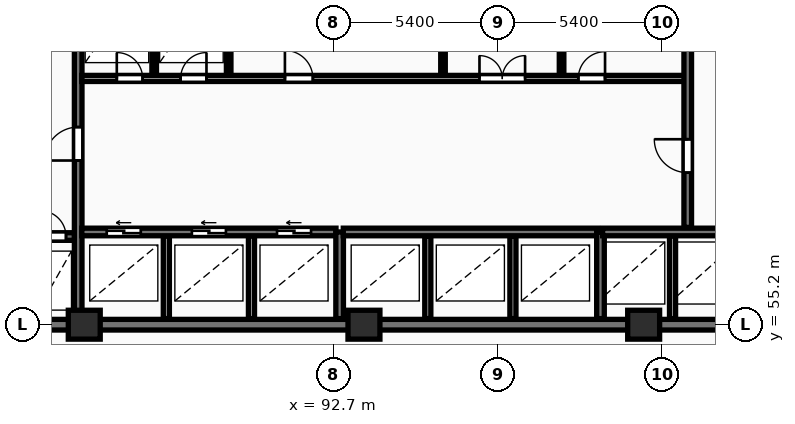
"""IFC4 building model, lengths in metres.
Left out: names, types, materials, properties, quantities, classifications, styles, units other than length and angle.
Written with IfcOpenShell. Run it as: python <this file> out.ifc"""

import sys

from ifc_helpers import new_model, si_unit, direction, frame, frame_2d, origin, origin_2d, place, context, subcontext, project, spatial, rectangle, extrude, element, fill, save


model = new_model("IFC4")
c1 = context("Model", 3, precision=1e-05, world=origin(), true_north=direction((0.0, 1.0)))
c2 = subcontext(c1, "Body", "Model", "MODEL_VIEW")
j1 = project(units=[si_unit("LENGTHUNIT", "METRE"), si_unit("PLANEANGLEUNIT", "RADIAN")], contexts=[c1])
p1 = place(None, origin())
s1 = spatial("IfcSite", under=j1, at=p1, CompositionType="ELEMENT")
p2 = place(p1, origin())
s2 = spatial("IfcBuilding", under=s1, at=p2, CompositionType="ELEMENT")
p3 = place(p2, frame((0.0, 0.0, 24.0)))
s3 = spatial("IfcBuildingStorey", under=s2, at=p3, CompositionType="ELEMENT", Elevation=24.0)
for number, where, z_axis, x_axis in (
    (1, (84.5, 55.2, 0.0), (0.0, 0.0, 1.0), (1.0, 0.0, 0.0)),
    (2, (93.7, 55.2, 0.0), (0.0, 0.0, 1.0), (1.0, 0.0, 0.0)),
    (3, (102.9, 55.2, 0.0), (0.0, 0.0, 1.0), (1.0, 0.0, 0.0)),
):
    element("IfcColumn", number, at=place(p3, frame(where, z_axis=z_axis, x_axis=x_axis)), inside=s3, PredefinedType="COLUMN", context=c2, shape_type="SweptSolid", body=[
        extrude(rectangle(XDim=1.05, YDim=0.95, at=origin_2d()), origin(), (0.0, 0.0, 1.0), 3.25),
    ])
p4 = place(p3, frame((75.95, 55.2, 0.0), z_axis=(0.0, 0.0, 1.0), x_axis=(1.0, 0.0, 0.0)))
e4 = element("IfcWall", 4, at=p4, inside=s3, PredefinedType="SHEAR", context=c2, shape_type="SweptSolid", body=[
    extrude(rectangle(XDim=36.3, YDim=0.35, at=frame_2d((18.15, 0.0))), origin(), (0.0, 0.0, 1.0), 3.25),
])
p5 = place(p3, frame((79.79, 58.1, 0.0), z_axis=(0.0, 0.0, 1.0), x_axis=(1.0, 0.0, 0.0)))
e5 = element("IfcWall", 5, at=p5, inside=s3, PredefinedType="SHEAR", context=c2, shape_type="SweptSolid", body=[
    extrude(rectangle(XDim=4.39, YDim=0.25, at=frame_2d((2.195, 0.0))), origin(), (0.0, 0.0, 1.0), 3.25),
])
p6 = place(p5, frame((1.05, 0.0, 0.0)))
e6 = element("IfcOpeningElement", 6, at=p6, cuts=e5, PredefinedType="OPENING", context=c2, shape_type="SweptSolid", body=[
    extrude(rectangle(XDim=1.12, YDim=2.12, at=frame_2d((0.56, 1.06))), frame((0.0, 0.135, 0.0), z_axis=(0.0, -1.0, 0.0), x_axis=(1.0, 0.0, 0.0)), (0.0, 0.0, 1.0), 0.27),
])
p7 = place(p5, frame((3.26, 0.0, 0.0)))
e7 = element("IfcOpeningElement", 7, at=p7, cuts=e5, PredefinedType="OPENING", context=c2, shape_type="SweptSolid", body=[
    extrude(rectangle(XDim=0.85, YDim=2.05, at=frame_2d((0.425, 1.025))), frame((0.0, 0.135, 0.0), z_axis=(0.0, -1.0, 0.0), x_axis=(1.0, 0.0, 0.0)), (0.0, 0.0, 1.0), 0.27),
])
p8 = place(p3, frame((84.3, 55.4, 0.0), z_axis=(0.0, 0.0, 1.0), x_axis=(0.0, 1.0, 0.0)))
e8 = element("IfcWall", 8, at=p8, inside=s3, PredefinedType="SHEAR", context=c2, shape_type="SweptSolid", body=[
    extrude(rectangle(XDim=11.6, YDim=0.25, at=frame_2d((5.8, 0.0))), origin(), (0.0, 0.0, 1.0), 3.25),
])
p9 = place(p8, frame((5.2, 0.0, 0.0)))
e9 = element("IfcOpeningElement", 9, at=p9, cuts=e8, PredefinedType="OPENING", context=c2, shape_type="SweptSolid", body=[
    extrude(rectangle(XDim=1.1, YDim=2.1, at=frame_2d((0.55, 1.05))), frame((0.0, 0.135, 0.0), z_axis=(0.0, -1.0, 0.0), x_axis=(1.0, 0.0, 0.0)), (0.0, 0.0, 1.0), 0.27),
])
for number, where, z_axis, x_axis in (
    (10, (87.2, 55.4, 0.0), (0.0, 0.0, 1.0), (0.0, 1.0, 0.0)),
    (11, (90.0, 55.4, 0.0), (0.0, 0.0, 1.0), (0.0, 1.0, 0.0)),
):
    element("IfcWall", number, at=place(p3, frame(where, z_axis=z_axis, x_axis=x_axis)), inside=s3, PredefinedType="PARTITIONING", context=c2, shape_type="SweptSolid", body=[
        extrude(rectangle(XDim=2.72, YDim=0.2, at=frame_2d((1.36, 0.0))), origin(), (0.0, 0.0, 1.0), 2.97),
    ])
p10 = place(p3, frame((84.42, 58.25, 0.0), z_axis=(0.0, 0.0, 1.0), x_axis=(1.0, 0.0, 0.0)))
e12 = element("IfcWall", 12, at=p10, inside=s3, PredefinedType="SHEAR", context=c2, shape_type="SweptSolid", body=[
    extrude(rectangle(XDim=8.36, YDim=0.25, at=frame_2d((4.18, 0.0))), origin(), (0.0, 0.0, 1.0), 3.25),
])
p11 = place(p10, frame((0.82, 0.0, 0.0)))
e13 = element("IfcOpeningElement", 13, at=p11, cuts=e12, PredefinedType="OPENING", context=c2, shape_type="SweptSolid", body=[
    extrude(rectangle(XDim=1.12, YDim=2.12, at=frame_2d((0.56, 1.06))), frame((0.0, 0.135, 0.0), z_axis=(0.0, -1.0, 0.0), x_axis=(1.0, 0.0, 0.0)), (0.0, 0.0, 1.0), 0.27),
])
p12 = place(p10, frame((3.62, 0.0, 0.0)))
e14 = element("IfcOpeningElement", 14, at=p12, cuts=e12, PredefinedType="OPENING", context=c2, shape_type="SweptSolid", body=[
    extrude(rectangle(XDim=1.12, YDim=2.12, at=frame_2d((0.56, 1.06))), frame((0.0, 0.135, 0.0), z_axis=(0.0, -1.0, 0.0), x_axis=(1.0, 0.0, 0.0)), (0.0, 0.0, 1.0), 0.27),
])
p13 = place(p10, frame((6.42, 0.0, 0.0)))
e15 = element("IfcOpeningElement", 15, at=p13, cuts=e12, PredefinedType="OPENING", context=c2, shape_type="SweptSolid", body=[
    extrude(rectangle(XDim=1.12, YDim=2.12, at=frame_2d((0.56, 1.06))), frame((0.0, 0.135, 0.0), z_axis=(0.0, -1.0, 0.0), x_axis=(1.0, 0.0, 0.0)), (0.0, 0.0, 1.0), 0.27),
])
p14 = place(p3, frame((92.9, 55.4, 0.0), z_axis=(0.0, 0.0, 1.0), x_axis=(0.0, 1.0, 0.0)))
e16 = element("IfcWall", 16, at=p14, inside=s3, PredefinedType="SHEAR", context=c2, shape_type="SweptSolid", body=[
    extrude(rectangle(XDim=2.85, YDim=0.25, at=frame_2d((1.425, 0.0))), origin(), (0.0, 0.0, 1.0), 3.25),
])
for number, where, z_axis, x_axis in (
    (17, (95.8, 55.4, 0.0), (0.0, 0.0, 1.0), (0.0, 1.0, 0.0)),
    (18, (98.6, 55.4, 0.0), (0.0, 0.0, 1.0), (0.0, 1.0, 0.0)),
):
    element("IfcWall", number, at=place(p3, frame(where, z_axis=z_axis, x_axis=x_axis)), inside=s3, PredefinedType="PARTITIONING", context=c2, shape_type="SweptSolid", body=[
        extrude(rectangle(XDim=2.72, YDim=0.2, at=frame_2d((1.36, 0.0))), origin(), (0.0, 0.0, 1.0), 2.97),
    ])
p15 = place(p3, frame((93.02, 58.25, 0.0), z_axis=(0.0, 0.0, 1.0), x_axis=(1.0, 0.0, 0.0)))
e19 = element("IfcWall", 19, at=p15, inside=s3, PredefinedType="SHEAR", context=c2, shape_type="SweptSolid", body=[
    extrude(rectangle(XDim=8.36, YDim=0.25, at=frame_2d((4.18, 0.0))), origin(), (0.0, 0.0, 1.0), 3.25),
])
p16 = place(p3, frame((101.48, 55.4, 0.0), z_axis=(0.0, 0.0, 1.0), x_axis=(0.0, 1.0, 0.0)))
e20 = element("IfcWall", 20, at=p16, inside=s3, PredefinedType="SHEAR", context=c2, shape_type="SweptSolid", body=[
    extrude(rectangle(XDim=2.85, YDim=0.25, at=frame_2d((1.425, 0.0))), origin(), (0.0, 0.0, 1.0), 3.25),
])
p17 = place(p3, frame((103.85, 55.4, 0.0), z_axis=(0.0, 0.0, 1.0), x_axis=(0.0, 1.0, 0.0)))
e21 = element("IfcWall", 21, at=p17, inside=s3, PredefinedType="PARTITIONING", context=c2, shape_type="SweptSolid", body=[
    extrude(rectangle(XDim=2.72, YDim=0.2, at=frame_2d((1.36, 0.0))), origin(), (0.0, 0.0, 1.0), 2.97),
])
p18 = place(p3, frame((101.55, 58.25, 0.0), z_axis=(0.0, 0.0, 1.0), x_axis=(1.0, 0.0, 0.0)))
e22 = element("IfcWall", 22, at=p18, inside=s3, PredefinedType="SHEAR", context=c2, shape_type="SweptSolid", body=[
    extrude(rectangle(XDim=4.6, YDim=0.25, at=frame_2d((2.3, 0.0))), origin(), (0.0, 0.0, 1.0), 3.25),
])
for number, where, z_axis, x_axis in (
    (23, (86.8, 63.4, 0.0), (0.0, 0.0, 1.0), (0.0, 1.0, 0.0)),
    (24, (89.25, 63.4, 0.0), (0.0, 0.0, 1.0), (0.0, 1.0, 0.0)),
    (25, (96.3, 63.4, 0.0), (0.0, 0.0, 1.0), (0.0, 1.0, 0.0)),
    (26, (100.2, 63.4, 0.0), (0.0, 0.0, 1.0), (0.0, 1.0, 0.0)),
):
    element("IfcWall", number, at=place(p3, frame(where, z_axis=z_axis, x_axis=x_axis)), inside=s3, PredefinedType="PARTITIONING", context=c2, shape_type="SweptSolid", body=[
        extrude(rectangle(XDim=3.6, YDim=0.15, at=frame_2d((1.8, 0.0))), origin(), (0.0, 0.0, 1.0), 2.97),
    ])
p19 = place(p3, frame((84.42, 63.3, 0.0), z_axis=(0.0, 0.0, 1.0), x_axis=(1.0, 0.0, 0.0)))
e27 = element("IfcWall", 27, at=p19, inside=s3, PredefinedType="PARTITIONING", context=c2, shape_type="SweptSolid", body=[
    extrude(rectangle(XDim=19.83, YDim=0.2, at=frame_2d((9.915, 0.0))), origin(), (0.0, 0.0, 1.0), 2.97),
])
p20 = place(p19, frame((1.15, 0.0, 0.0)))
e28 = element("IfcOpeningElement", 28, at=p20, cuts=e27, PredefinedType="OPENING", context=c2, shape_type="SweptSolid", body=[
    extrude(rectangle(XDim=0.85, YDim=2.05, at=frame_2d((0.425, 1.025))), frame((0.0, 0.11, 0.0), z_axis=(0.0, -1.0, 0.0), x_axis=(1.0, 0.0, 0.0)), (0.0, 0.0, 1.0), 0.22),
])
p21 = place(p19, frame((3.25, 0.0, 0.0)))
e29 = element("IfcOpeningElement", 29, at=p21, cuts=e27, PredefinedType="OPENING", context=c2, shape_type="SweptSolid", body=[
    extrude(rectangle(XDim=0.85, YDim=2.05, at=frame_2d((0.425, 1.025))), frame((0.0, 0.11, 0.0), z_axis=(0.0, -1.0, 0.0), x_axis=(1.0, 0.0, 0.0)), (0.0, 0.0, 1.0), 0.22),
])
p22 = place(p19, frame((13.08, 0.0, 0.0)))
e30 = element("IfcOpeningElement", 30, at=p22, cuts=e27, PredefinedType="OPENING", context=c2, shape_type="SweptSolid", body=[
    extrude(rectangle(XDim=1.5, YDim=2.2, at=frame_2d((0.75, 1.1))), frame((0.0, 0.11, 0.0), z_axis=(0.0, -1.0, 0.0), x_axis=(1.0, 0.0, 0.0)), (0.0, 0.0, 1.0), 0.22),
])
p23 = place(p19, frame((6.68, 0.0, 0.0)))
e31 = element("IfcOpeningElement", 31, at=p23, cuts=e27, PredefinedType="OPENING", context=c2, shape_type="SweptSolid", body=[
    extrude(rectangle(XDim=0.92, YDim=2.08, at=frame_2d((0.46, 1.04))), frame((0.0, 0.11, 0.0), z_axis=(0.0, -1.0, 0.0), x_axis=(1.0, 0.0, 0.0)), (0.0, 0.0, 1.0), 0.22),
])
p24 = place(p19, frame((16.33, 0.0, 0.0)))
e32 = element("IfcOpeningElement", 32, at=p24, cuts=e27, PredefinedType="OPENING", context=c2, shape_type="SweptSolid", body=[
    extrude(rectangle(XDim=0.88, YDim=2.06, at=frame_2d((0.44, 1.03))), frame((0.0, 0.11, 0.0), z_axis=(0.0, -1.0, 0.0), x_axis=(1.0, 0.0, 0.0)), (0.0, 0.0, 1.0), 0.22),
])
p25 = place(p3, frame((104.35, 58.4, 0.0), z_axis=(0.0, 0.0, 1.0), x_axis=(0.0, 1.0, 0.0)))
e33 = element("IfcWall", 33, at=p25, inside=s3, PredefinedType="SHEAR", context=c2, shape_type="SweptSolid", body=[
    extrude(rectangle(XDim=8.6, YDim=0.25, at=frame_2d((4.3, 0.0))), origin(), (0.0, 0.0, 1.0), 3.25),
])
p26 = place(p25, frame((1.8, 0.0, 0.0)))
e34 = element("IfcOpeningElement", 34, at=p26, cuts=e33, PredefinedType="OPENING", context=c2, shape_type="SweptSolid", body=[
    extrude(rectangle(XDim=1.1, YDim=2.1, at=frame_2d((0.55, 1.05))), frame((0.0, 0.135, 0.0), z_axis=(0.0, -1.0, 0.0), x_axis=(1.0, 0.0, 0.0)), (0.0, 0.0, 1.0), 0.27),
])
p27 = place(p7, origin())
e35 = element("IfcDoor", 35, at=p27, inside=s3, OperationType="SINGLE_SWING_LEFT", PredefinedType="DOOR", context=c2, shape_type="SweptSolid", body=[
    extrude(rectangle(XDim=0.85, YDim=2.05, at=frame_2d((0.425, 1.025))), frame((0.0, 0.025, 0.0), z_axis=(0.0, -1.0, 0.0), x_axis=(1.0, 0.0, 0.0)), (0.0, 0.0, 1.0), 0.05),
])
fill(e7, e35)
p28 = place(p9, origin())
e36 = element("IfcDoor", 36, at=p28, inside=s3, OperationType="SINGLE_SWING_LEFT", PredefinedType="DOOR", context=c2, shape_type="SweptSolid", body=[
    extrude(rectangle(XDim=1.1, YDim=2.1, at=frame_2d((0.55, 1.05))), frame((0.0, 0.025, 0.0), z_axis=(0.0, -1.0, 0.0), x_axis=(1.0, 0.0, 0.0)), (0.0, 0.0, 1.0), 0.05),
])
fill(e9, e36)
p29 = place(p11, origin())
e37 = element("IfcDoor", 37, at=p29, inside=s3, OperationType="SLIDING_TO_LEFT", PredefinedType="DOOR", context=c2, shape_type="SweptSolid", body=[
    extrude(rectangle(XDim=1.12, YDim=2.12, at=frame_2d((0.56, 1.06))), frame((0.0, 0.025, 0.0), z_axis=(0.0, -1.0, 0.0), x_axis=(1.0, 0.0, 0.0)), (0.0, 0.0, 1.0), 0.05),
])
fill(e13, e37)
p30 = place(p12, origin())
e38 = element("IfcDoor", 38, at=p30, inside=s3, OperationType="SLIDING_TO_LEFT", PredefinedType="DOOR", context=c2, shape_type="SweptSolid", body=[
    extrude(rectangle(XDim=1.12, YDim=2.12, at=frame_2d((0.56, 1.06))), frame((0.0, 0.025, 0.0), z_axis=(0.0, -1.0, 0.0), x_axis=(1.0, 0.0, 0.0)), (0.0, 0.0, 1.0), 0.05),
])
fill(e14, e38)
p31 = place(p13, origin())
e39 = element("IfcDoor", 39, at=p31, inside=s3, OperationType="SLIDING_TO_LEFT", PredefinedType="DOOR", context=c2, shape_type="SweptSolid", body=[
    extrude(rectangle(XDim=1.12, YDim=2.12, at=frame_2d((0.56, 1.06))), frame((0.0, 0.025, 0.0), z_axis=(0.0, -1.0, 0.0), x_axis=(1.0, 0.0, 0.0)), (0.0, 0.0, 1.0), 0.05),
])
fill(e15, e39)
p32 = place(p20, origin())
e40 = element("IfcDoor", 40, at=p32, inside=s3, OperationType="SINGLE_SWING_LEFT", PredefinedType="DOOR", context=c2, shape_type="SweptSolid", body=[
    extrude(rectangle(XDim=0.85, YDim=2.05, at=frame_2d((0.425, 1.025))), frame((0.0, 0.025, 0.0), z_axis=(0.0, -1.0, 0.0), x_axis=(1.0, 0.0, 0.0)), (0.0, 0.0, 1.0), 0.05),
])
fill(e28, e40)
p33 = place(p21, origin())
e41 = element("IfcDoor", 41, at=p33, inside=s3, OperationType="SINGLE_SWING_RIGHT", PredefinedType="DOOR", context=c2, shape_type="SweptSolid", body=[
    extrude(rectangle(XDim=0.85, YDim=2.05, at=frame_2d((0.425, 1.025))), frame((0.0, 0.025, 0.0), z_axis=(0.0, -1.0, 0.0), x_axis=(1.0, 0.0, 0.0)), (0.0, 0.0, 1.0), 0.05),
])
fill(e29, e41)
p34 = place(p22, origin())
e42 = element("IfcDoor", 42, at=p34, inside=s3, OperationType="DOUBLE_DOOR_SINGLE_SWING", PredefinedType="DOOR", context=c2, shape_type="SweptSolid", body=[
    extrude(rectangle(XDim=1.5, YDim=2.2, at=frame_2d((0.75, 1.1))), frame((0.0, 0.025, 0.0), z_axis=(0.0, -1.0, 0.0), x_axis=(1.0, 0.0, 0.0)), (0.0, 0.0, 1.0), 0.05),
])
fill(e30, e42)
p35 = place(p23, origin())
e43 = element("IfcDoor", 43, at=p35, inside=s3, OperationType="SINGLE_SWING_LEFT", PredefinedType="DOOR", context=c2, shape_type="SweptSolid", body=[
    extrude(rectangle(XDim=0.92, YDim=2.08, at=frame_2d((0.46, 1.04))), frame((0.0, 0.025, 0.0), z_axis=(0.0, -1.0, 0.0), x_axis=(1.0, 0.0, 0.0)), (0.0, 0.0, 1.0), 0.05),
])
fill(e31, e43)
p36 = place(p24, origin())
e44 = element("IfcDoor", 44, at=p36, inside=s3, OperationType="SINGLE_SWING_RIGHT", PredefinedType="DOOR", context=c2, shape_type="SweptSolid", body=[
    extrude(rectangle(XDim=0.88, YDim=2.06, at=frame_2d((0.44, 1.03))), frame((0.0, 0.025, 0.0), z_axis=(0.0, -1.0, 0.0), x_axis=(1.0, 0.0, 0.0)), (0.0, 0.0, 1.0), 0.05),
])
fill(e32, e44)
p37 = place(p26, origin())
e45 = element("IfcDoor", 45, at=p37, inside=s3, OperationType="SINGLE_SWING_RIGHT", PredefinedType="DOOR", context=c2, shape_type="SweptSolid", body=[
    extrude(rectangle(XDim=1.1, YDim=2.1, at=frame_2d((0.55, 1.05))), frame((0.0, 0.025, 0.0), z_axis=(0.0, -1.0, 0.0), x_axis=(1.0, 0.0, 0.0)), (0.0, 0.0, 1.0), 0.05),
])
fill(e34, e45)
save(model, sys.argv[1])
